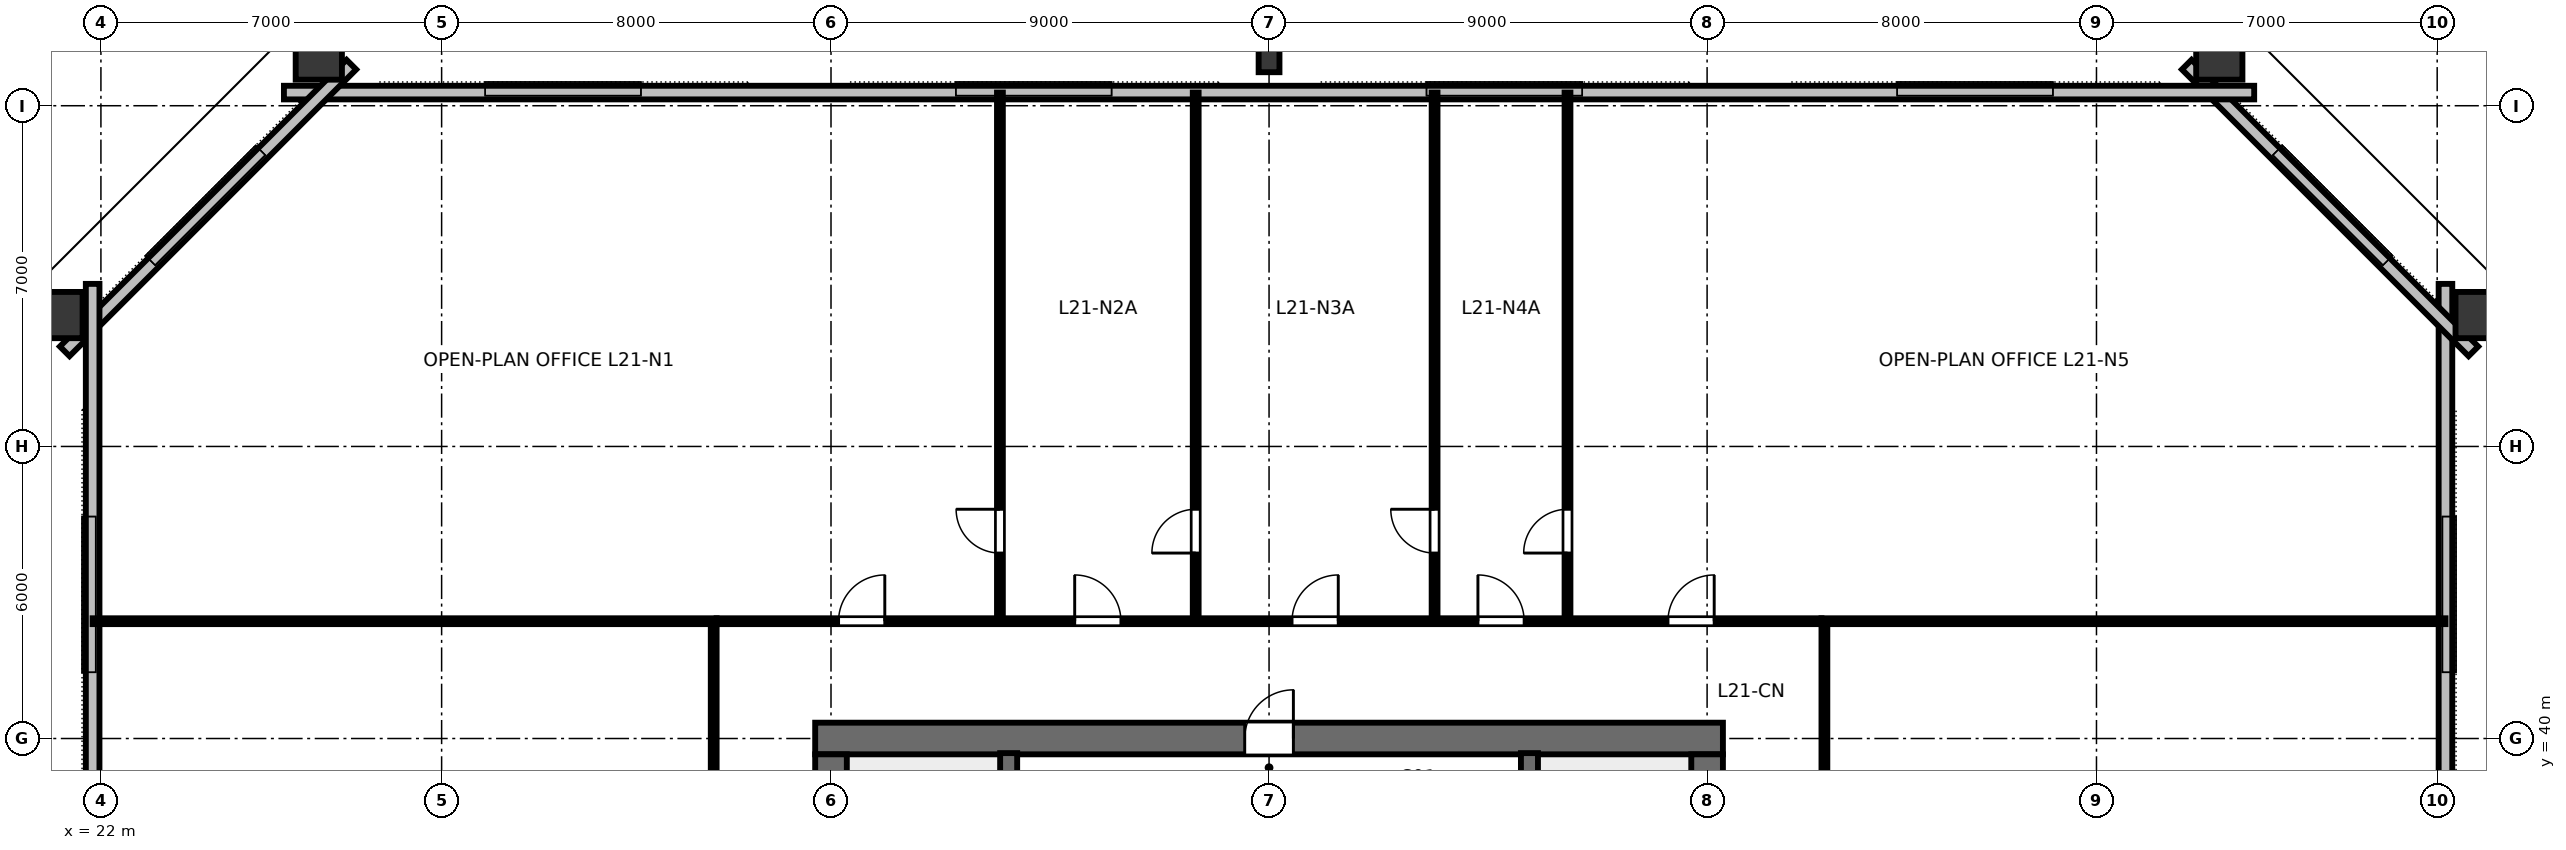
"""IFC4 building model, lengths in metres.
Left out: names, types, materials, properties, quantities, classifications, styles, units other than length and angle.
Written with IfcOpenShell. Run it as: python <this file> out.ifc"""

import sys

from ifc_helpers import new_model, si_unit, direction, frame, frame_2d, origin, origin_2d, place, context, subcontext, project, spatial, rectangle, hollow_rectangle, i_section, extrude, element, fill, save


model = new_model("IFC4")
c1 = context("Model", 3, precision=1e-05, world=origin(), true_north=direction((0.0, 1.0)))
c2 = subcontext(c1, "Body", "Model", "MODEL_VIEW")
j1 = project(units=[si_unit("LENGTHUNIT", "METRE"), si_unit("PLANEANGLEUNIT", "RADIAN")], contexts=[c1])
p1 = place(None, origin())
s1 = spatial("IfcSite", under=j1, at=p1, CompositionType="ELEMENT")
p2 = place(p1, origin())
s2 = spatial("IfcBuilding", under=s1, at=p2, CompositionType="ELEMENT")
p3 = place(p2, frame((0.0, 0.0, 82.0)))
s3 = spatial("IfcBuildingStorey", under=s2, at=p3, CompositionType="ELEMENT", Elevation=82.0)
p4 = place(p3, frame((36.675, 40.0, 0.0), z_axis=(0.0, 0.0, 1.0), x_axis=(1.0, 0.0, 0.0)))
e1 = element("IfcWall", 1, at=p4, inside=s3, PredefinedType="SHEAR", context=c2, shape_type="SweptSolid", body=[
    extrude(rectangle(XDim=18.65, YDim=0.65, at=frame_2d((9.325, 0.0))), origin(), (0.0, 0.0, 1.0), 3.28),
])
p5 = place(p4, frame((8.825, 0.0, 0.0)))
e2 = element("IfcOpeningElement", 2, at=p5, cuts=e1, PredefinedType="OPENING", context=c2, shape_type="SweptSolid", body=[
    extrude(rectangle(XDim=1.0, YDim=2.15, at=frame_2d((0.5, 1.075))), frame((0.0, 0.335, 0.0), z_axis=(0.0, -1.0, 0.0), x_axis=(1.0, 0.0, 0.0)), (0.0, 0.0, 1.0), 0.67),
])
p6 = place(p3, frame((37.0, 24.325, 0.0), z_axis=(0.0, 0.0, 1.0), x_axis=(0.0, 1.0, 0.0)))
e3 = element("IfcWall", 3, at=p6, inside=s3, PredefinedType="SHEAR", context=c2, shape_type="SweptSolid", body=[
    extrude(rectangle(XDim=15.35, YDim=0.65, at=frame_2d((7.675, 0.0))), origin(), (0.0, 0.0, 1.0), 3.28),
])
p7 = place(p6, frame((5.2, 0.0, 0.0)))
e4 = element("IfcOpeningElement", 4, at=p7, cuts=e3, PredefinedType="OPENING", context=c2, shape_type="SweptSolid", body=[
    extrude(rectangle(XDim=1.15, YDim=2.15, at=frame_2d((0.575, 1.075))), frame((0.0, 0.335, 0.0), z_axis=(0.0, -1.0, 0.0), x_axis=(1.0, 0.0, 0.0)), (0.0, 0.0, 1.0), 0.67),
])
p8 = place(p3, frame((55.0, 24.325, 0.0), z_axis=(0.0, 0.0, 1.0), x_axis=(0.0, 1.0, 0.0)))
e5 = element("IfcWall", 5, at=p8, inside=s3, PredefinedType="SHEAR", context=c2, shape_type="SweptSolid", body=[
    extrude(rectangle(XDim=15.35, YDim=0.65, at=frame_2d((7.675, 0.0))), origin(), (0.0, 0.0, 1.0), 3.28),
])
p9 = place(p8, frame((5.2, 0.0, 0.0)))
e6 = element("IfcOpeningElement", 6, at=p9, cuts=e5, PredefinedType="OPENING", context=c2, shape_type="SweptSolid", body=[
    extrude(rectangle(XDim=1.15, YDim=2.15, at=frame_2d((0.575, 1.075))), frame((0.0, 0.335, 0.0), z_axis=(0.0, -1.0, 0.0), x_axis=(1.0, 0.0, 0.0)), (0.0, 0.0, 1.0), 0.67),
])
p10 = place(p3, frame((70.952, 48.699, 0.0), z_axis=(-0.066122964366, -0.070348310744, 0.995328523031), x_axis=(0.6816861236, 0.725246783964, 0.096546005827)))
e7 = element("IfcColumn", 7, at=p10, inside=s3, PredefinedType="COLUMN", context=c2, shape_type="SweptSolid", body=[
    extrude(hollow_rectangle(XDim=0.95, YDim=1.15, WallThickness=0.06, at=origin_2d()), origin(), (0.0, 0.0, 1.0), 3.293),
])
p11 = place(p3, frame((65.523, 54.11, 0.0), z_axis=(-0.080491878848, -0.056033020634, 0.99517905828), x_axis=(0.571330166379, -0.82072031837, 0.0)))
e8 = element("IfcColumn", 8, at=p11, inside=s3, PredefinedType="COLUMN", context=c2, shape_type="SweptSolid", body=[
    extrude(hollow_rectangle(XDim=0.95, YDim=1.15, WallThickness=0.06, at=origin_2d()), origin(), (0.0, 0.0, 1.0), 3.294),
])
p12 = place(p3, frame((46.0, 53.93, 0.0), z_axis=(0.0, -0.055844793021, 0.998439461907), x_axis=(1.0, 0.0, 0.0)))
e9 = element("IfcColumn", 9, at=p12, inside=s3, PredefinedType="COLUMN", context=c2, shape_type="SweptSolid", body=[
    extrude(i_section(OverallWidth=0.428, OverallDepth=0.483, WebThickness=0.051, FlangeThickness=0.082, FilletRadius=0.025, at=origin_2d()), origin(), (0.0, 0.0, 1.0), 3.283),
])
p13 = place(p3, frame((26.477, 54.11, 0.0), z_axis=(0.080491878848, -0.056033020634, 0.99517905828), x_axis=(0.571330166379, 0.82072031837, 0.0)))
e10 = element("IfcColumn", 10, at=p13, inside=s3, PredefinedType="COLUMN", context=c2, shape_type="SweptSolid", body=[
    extrude(hollow_rectangle(XDim=0.95, YDim=1.15, WallThickness=0.06, at=origin_2d()), origin(), (0.0, 0.0, 1.0), 3.294),
])
p14 = place(p3, frame((21.048, 48.699, 0.0), z_axis=(0.066122964366, -0.070348310744, 0.995328523031), x_axis=(-0.6816861236, 0.725246783964, 0.096546005827)))
e11 = element("IfcColumn", 11, at=p14, inside=s3, PredefinedType="COLUMN", context=c2, shape_type="SweptSolid", body=[
    extrude(hollow_rectangle(XDim=0.95, YDim=1.15, WallThickness=0.06, at=origin_2d()), origin(), (0.0, 0.0, 1.0), 3.293),
])
p15 = place(p3, frame((70.17, 14.66, 0.0), z_axis=(0.0, 0.0, 1.0), x_axis=(0.0, 1.0, 0.0)))
e12 = element("IfcWall", 12, at=p15, inside=s3, PredefinedType="STANDARD", context=c2, shape_type="SweptSolid", body=[
    extrude(rectangle(XDim=34.68, YDim=0.28, at=frame_2d((17.34, 0.0))), origin(), (0.0, 0.0, 1.0), 3.28),
])
p16 = place(p3, frame((70.744, 47.955, 0.0), z_axis=(0.0, 0.0, 1.0), x_axis=(-0.707106781187, 0.707106781187, 0.0)))
e13 = element("IfcWall", 13, at=p16, inside=s3, PredefinedType="STANDARD", context=c2, shape_type="SweptSolid", body=[
    extrude(rectangle(XDim=8.329, YDim=0.28, at=frame_2d((4.165, 0.0))), origin(), (0.0, 0.0, 1.0), 2.343),
])
p17 = place(p3, frame((66.24, 53.27, 0.0), z_axis=(0.0, 0.0, 1.0), x_axis=(-1.0, 0.0, 0.0)))
e14 = element("IfcWall", 14, at=p17, inside=s3, PredefinedType="STANDARD", context=c2, shape_type="SweptSolid", body=[
    extrude(rectangle(XDim=40.48, YDim=0.28, at=frame_2d((20.24, 0.0))), origin(), (0.0, 0.0, 1.0), 3.28),
])
p18 = place(p3, frame((27.146, 53.844, 0.0), z_axis=(0.0, 0.0, 1.0), x_axis=(-0.707106781187, -0.707106781187, 0.0)))
e15 = element("IfcWall", 15, at=p18, inside=s3, PredefinedType="STANDARD", context=c2, shape_type="SweptSolid", body=[
    extrude(rectangle(XDim=8.329, YDim=0.28, at=frame_2d((4.165, 0.0))), origin(), (0.0, 0.0, 1.0), 2.343),
])
p19 = place(p3, frame((21.83, 49.34, 0.0), z_axis=(0.0, 0.0, 1.0), x_axis=(0.0, -1.0, 0.0)))
e16 = element("IfcWall", 16, at=p19, inside=s3, PredefinedType="STANDARD", context=c2, shape_type="SweptSolid", body=[
    extrude(rectangle(XDim=34.68, YDim=0.28, at=frame_2d((17.34, 0.0))), origin(), (0.0, 0.0, 1.0), 3.28),
])
for number, where, z_axis, x_axis in (
    (17, (40.65, 32.0, 0.0), (0.0, 0.0, 1.0), (0.0, 1.0, 0.0)),
    (18, (51.35, 32.0, 0.0), (0.0, 0.0, 1.0), (0.0, 1.0, 0.0)),
):
    element("IfcWall", number, at=place(p3, frame(where, z_axis=z_axis, x_axis=x_axis)), inside=s3, PredefinedType="SHEAR", context=c2, shape_type="SweptSolid", body=[
        extrude(rectangle(XDim=7.7, YDim=0.35, at=frame_2d((3.85, 0.0))), origin(), (0.0, 0.0, 1.0), 3.6),
    ])
p20 = place(p3, frame((40.471, 42.41, 0.0), z_axis=(0.0, 0.0, 1.0), x_axis=(0.0, 1.0, 0.0)))
e19 = element("IfcWall", 19, at=p20, inside=s3, PredefinedType="PARTITIONING", context=c2, shape_type="SweptSolid", body=[
    extrude(rectangle(XDim=10.86, YDim=0.12, at=frame_2d((5.43, 0.0))), origin(), (0.0, 0.0, 1.0), 2.56),
])
p21 = place(p20, frame((1.4, 0.0, 0.0)))
e20 = element("IfcOpeningElement", 20, at=p21, cuts=e19, PredefinedType="OPENING", context=c2, shape_type="SweptSolid", body=[
    extrude(rectangle(XDim=0.9, YDim=2.15, at=frame_2d((0.45, 1.075))), frame((0.0, 0.07, 0.0), z_axis=(0.0, -1.0, 0.0), x_axis=(1.0, 0.0, 0.0)), (0.0, 0.0, 1.0), 0.14),
])
p22 = place(p3, frame((44.493, 42.41, 0.0), z_axis=(0.0, 0.0, 1.0), x_axis=(0.0, 1.0, 0.0)))
e21 = element("IfcWall", 21, at=p22, inside=s3, PredefinedType="PARTITIONING", context=c2, shape_type="SweptSolid", body=[
    extrude(rectangle(XDim=10.86, YDim=0.12, at=frame_2d((5.43, 0.0))), origin(), (0.0, 0.0, 1.0), 2.56),
])
p23 = place(p22, frame((1.4, 0.0, 0.0)))
e22 = element("IfcOpeningElement", 22, at=p23, cuts=e21, PredefinedType="OPENING", context=c2, shape_type="SweptSolid", body=[
    extrude(rectangle(XDim=0.9, YDim=2.15, at=frame_2d((0.45, 1.075))), frame((0.0, 0.07, 0.0), z_axis=(0.0, -1.0, 0.0), x_axis=(1.0, 0.0, 0.0)), (0.0, 0.0, 1.0), 0.14),
])
p24 = place(p3, frame((49.401, 42.41, 0.0), z_axis=(0.0, 0.0, 1.0), x_axis=(0.0, 1.0, 0.0)))
e23 = element("IfcWall", 23, at=p24, inside=s3, PredefinedType="PARTITIONING", context=c2, shape_type="SweptSolid", body=[
    extrude(rectangle(XDim=10.86, YDim=0.12, at=frame_2d((5.43, 0.0))), origin(), (0.0, 0.0, 1.0), 2.56),
])
p25 = place(p24, frame((1.4, 0.0, 0.0)))
e24 = element("IfcOpeningElement", 24, at=p25, cuts=e23, PredefinedType="OPENING", context=c2, shape_type="SweptSolid", body=[
    extrude(rectangle(XDim=0.9, YDim=2.15, at=frame_2d((0.45, 1.075))), frame((0.0, 0.07, 0.0), z_axis=(0.0, -1.0, 0.0), x_axis=(1.0, 0.0, 0.0)), (0.0, 0.0, 1.0), 0.14),
])
p26 = place(p3, frame((52.132, 42.41, 0.0), z_axis=(0.0, 0.0, 1.0), x_axis=(0.0, 1.0, 0.0)))
e25 = element("IfcWall", 25, at=p26, inside=s3, PredefinedType="PARTITIONING", context=c2, shape_type="SweptSolid", body=[
    extrude(rectangle(XDim=10.86, YDim=0.12, at=frame_2d((5.43, 0.0))), origin(), (0.0, 0.0, 1.0), 2.56),
])
p27 = place(p26, frame((1.4, 0.0, 0.0)))
e26 = element("IfcOpeningElement", 26, at=p27, cuts=e25, PredefinedType="OPENING", context=c2, shape_type="SweptSolid", body=[
    extrude(rectangle(XDim=0.9, YDim=2.15, at=frame_2d((0.45, 1.075))), frame((0.0, 0.07, 0.0), z_axis=(0.0, -1.0, 0.0), x_axis=(1.0, 0.0, 0.0)), (0.0, 0.0, 1.0), 0.14),
])
p28 = place(p3, frame((34.65, 42.41, 0.0), z_axis=(0.0, 0.0, 1.0), x_axis=(1.0, 0.0, 0.0)))
e27 = element("IfcWall", 27, at=p28, inside=s3, PredefinedType="PARTITIONING", context=c2, shape_type="SweptSolid", body=[
    extrude(rectangle(XDim=22.7, YDim=0.12, at=frame_2d((11.35, 0.0))), origin(), (0.0, 0.0, 1.0), 2.56),
])
p29 = place(p28, frame((2.505, 0.0, 0.0)))
e28 = element("IfcOpeningElement", 28, at=p29, cuts=e27, PredefinedType="OPENING", context=c2, shape_type="SweptSolid", body=[
    extrude(rectangle(XDim=0.95, YDim=2.15, at=frame_2d((0.475, 1.075))), frame((0.0, 0.07, 0.0), z_axis=(0.0, -1.0, 0.0), x_axis=(1.0, 0.0, 0.0)), (0.0, 0.0, 1.0), 0.14),
])
p30 = place(p28, frame((7.357, 0.0, 0.0)))
e29 = element("IfcOpeningElement", 29, at=p30, cuts=e27, PredefinedType="OPENING", context=c2, shape_type="SweptSolid", body=[
    extrude(rectangle(XDim=0.95, YDim=2.15, at=frame_2d((0.475, 1.075))), frame((0.0, 0.07, 0.0), z_axis=(0.0, -1.0, 0.0), x_axis=(1.0, 0.0, 0.0)), (0.0, 0.0, 1.0), 0.14),
])
p31 = place(p28, frame((11.822, 0.0, 0.0)))
e30 = element("IfcOpeningElement", 30, at=p31, cuts=e27, PredefinedType="OPENING", context=c2, shape_type="SweptSolid", body=[
    extrude(rectangle(XDim=0.95, YDim=2.15, at=frame_2d((0.475, 1.075))), frame((0.0, 0.07, 0.0), z_axis=(0.0, -1.0, 0.0), x_axis=(1.0, 0.0, 0.0)), (0.0, 0.0, 1.0), 0.14),
])
p32 = place(p28, frame((15.641, 0.0, 0.0)))
e31 = element("IfcOpeningElement", 31, at=p32, cuts=e27, PredefinedType="OPENING", context=c2, shape_type="SweptSolid", body=[
    extrude(rectangle(XDim=0.95, YDim=2.15, at=frame_2d((0.475, 1.075))), frame((0.0, 0.07, 0.0), z_axis=(0.0, -1.0, 0.0), x_axis=(1.0, 0.0, 0.0)), (0.0, 0.0, 1.0), 0.14),
])
p33 = place(p28, frame((19.546, 0.0, 0.0)))
e32 = element("IfcOpeningElement", 32, at=p33, cuts=e27, PredefinedType="OPENING", context=c2, shape_type="SweptSolid", body=[
    extrude(rectangle(XDim=0.95, YDim=2.15, at=frame_2d((0.475, 1.075))), frame((0.0, 0.07, 0.0), z_axis=(0.0, -1.0, 0.0), x_axis=(1.0, 0.0, 0.0)), (0.0, 0.0, 1.0), 0.14),
])
p34 = place(p3, frame((34.59, 21.65, 0.0), z_axis=(0.0, 0.0, 1.0), x_axis=(0.0, 1.0, 0.0)))
e33 = element("IfcWall", 33, at=p34, inside=s3, PredefinedType="PARTITIONING", context=c2, shape_type="SweptSolid", body=[
    extrude(rectangle(XDim=20.7, YDim=0.12, at=frame_2d((10.35, 0.0))), origin(), (0.0, 0.0, 1.0), 2.56),
])
p35 = place(p34, frame((9.875, 0.0, 0.0)))
e34 = element("IfcOpeningElement", 34, at=p35, cuts=e33, PredefinedType="OPENING", context=c2, shape_type="SweptSolid", body=[
    extrude(rectangle(XDim=0.95, YDim=2.15, at=frame_2d((0.475, 1.075))), frame((0.0, 0.07, 0.0), z_axis=(0.0, -1.0, 0.0), x_axis=(1.0, 0.0, 0.0)), (0.0, 0.0, 1.0), 0.14),
])
p36 = place(p3, frame((57.41, 21.65, 0.0), z_axis=(0.0, 0.0, 1.0), x_axis=(0.0, 1.0, 0.0)))
e35 = element("IfcWall", 35, at=p36, inside=s3, PredefinedType="PARTITIONING", context=c2, shape_type="SweptSolid", body=[
    extrude(rectangle(XDim=20.7, YDim=0.12, at=frame_2d((10.35, 0.0))), origin(), (0.0, 0.0, 1.0), 2.56),
])
p37 = place(p36, frame((6.128, 0.0, 0.0)))
e36 = element("IfcOpeningElement", 36, at=p37, cuts=e35, PredefinedType="OPENING", context=c2, shape_type="SweptSolid", body=[
    extrude(rectangle(XDim=0.95, YDim=2.15, at=frame_2d((0.475, 1.075))), frame((0.0, 0.07, 0.0), z_axis=(0.0, -1.0, 0.0), x_axis=(1.0, 0.0, 0.0)), (0.0, 0.0, 1.0), 0.14),
])
p38 = place(p36, frame((16.278, 0.0, 0.0)))
e37 = element("IfcOpeningElement", 37, at=p38, cuts=e35, PredefinedType="OPENING", context=c2, shape_type="SweptSolid", body=[
    extrude(rectangle(XDim=0.95, YDim=2.15, at=frame_2d((0.475, 1.075))), frame((0.0, 0.07, 0.0), z_axis=(0.0, -1.0, 0.0), x_axis=(1.0, 0.0, 0.0)), (0.0, 0.0, 1.0), 0.14),
])
for number, where, z_axis, x_axis in (
    (38, (34.65, 42.41, 0.0), (0.0, 0.0, 1.0), (-1.0, 0.0, 0.0)),
    (39, (57.35, 42.41, 0.0), (0.0, 0.0, 1.0), (1.0, 0.0, 0.0)),
):
    element("IfcWall", number, at=place(p3, frame(where, z_axis=z_axis, x_axis=x_axis)), inside=s3, PredefinedType="PARTITIONING", context=c2, shape_type="SweptSolid", body=[
        extrude(rectangle(XDim=12.82, YDim=0.12, at=frame_2d((6.41, 0.0))), origin(), (0.0, 0.0, 1.0), 2.56),
    ])
p39 = place(p5, origin())
e40 = element("IfcDoor", 40, at=p39, inside=s3, OperationType="SINGLE_SWING_RIGHT", PredefinedType="DOOR", context=c2, shape_type="SweptSolid", body=[
    extrude(rectangle(XDim=1.0, YDim=2.15, at=frame_2d((0.5, 1.075))), frame((0.0, 0.025, 0.0), z_axis=(0.0, -1.0, 0.0), x_axis=(1.0, 0.0, 0.0)), (0.0, 0.0, 1.0), 0.05),
])
fill(e2, e40)
p40 = place(p21, origin())
e41 = element("IfcDoor", 41, at=p40, inside=s3, OperationType="SINGLE_SWING_RIGHT", PredefinedType="DOOR", context=c2, shape_type="SweptSolid", body=[
    extrude(rectangle(XDim=0.9, YDim=2.15, at=frame_2d((0.45, 1.075))), frame((0.0, 0.025, 0.0), z_axis=(0.0, -1.0, 0.0), x_axis=(1.0, 0.0, 0.0)), (0.0, 0.0, 1.0), 0.05),
])
fill(e20, e41)
p41 = place(p23, origin())
e42 = element("IfcDoor", 42, at=p41, inside=s3, OperationType="SINGLE_SWING_LEFT", PredefinedType="DOOR", context=c2, shape_type="SweptSolid", body=[
    extrude(rectangle(XDim=0.9, YDim=2.15, at=frame_2d((0.45, 1.075))), frame((0.0, 0.025, 0.0), z_axis=(0.0, -1.0, 0.0), x_axis=(1.0, 0.0, 0.0)), (0.0, 0.0, 1.0), 0.05),
])
fill(e22, e42)
p42 = place(p25, origin())
e43 = element("IfcDoor", 43, at=p42, inside=s3, OperationType="SINGLE_SWING_RIGHT", PredefinedType="DOOR", context=c2, shape_type="SweptSolid", body=[
    extrude(rectangle(XDim=0.9, YDim=2.15, at=frame_2d((0.45, 1.075))), frame((0.0, 0.025, 0.0), z_axis=(0.0, -1.0, 0.0), x_axis=(1.0, 0.0, 0.0)), (0.0, 0.0, 1.0), 0.05),
])
fill(e24, e43)
p43 = place(p27, origin())
e44 = element("IfcDoor", 44, at=p43, inside=s3, OperationType="SINGLE_SWING_LEFT", PredefinedType="DOOR", context=c2, shape_type="SweptSolid", body=[
    extrude(rectangle(XDim=0.9, YDim=2.15, at=frame_2d((0.45, 1.075))), frame((0.0, 0.025, 0.0), z_axis=(0.0, -1.0, 0.0), x_axis=(1.0, 0.0, 0.0)), (0.0, 0.0, 1.0), 0.05),
])
fill(e26, e44)
p44 = place(p29, origin())
e45 = element("IfcDoor", 45, at=p44, inside=s3, OperationType="SINGLE_SWING_RIGHT", PredefinedType="DOOR", context=c2, shape_type="SweptSolid", body=[
    extrude(rectangle(XDim=0.95, YDim=2.15, at=frame_2d((0.475, 1.075))), frame((0.0, 0.025, 0.0), z_axis=(0.0, -1.0, 0.0), x_axis=(1.0, 0.0, 0.0)), (0.0, 0.0, 1.0), 0.05),
])
fill(e28, e45)
p45 = place(p30, origin())
e46 = element("IfcDoor", 46, at=p45, inside=s3, OperationType="SINGLE_SWING_LEFT", PredefinedType="DOOR", context=c2, shape_type="SweptSolid", body=[
    extrude(rectangle(XDim=0.95, YDim=2.15, at=frame_2d((0.475, 1.075))), frame((0.0, 0.025, 0.0), z_axis=(0.0, -1.0, 0.0), x_axis=(1.0, 0.0, 0.0)), (0.0, 0.0, 1.0), 0.05),
])
fill(e29, e46)
p46 = place(p31, origin())
e47 = element("IfcDoor", 47, at=p46, inside=s3, OperationType="SINGLE_SWING_RIGHT", PredefinedType="DOOR", context=c2, shape_type="SweptSolid", body=[
    extrude(rectangle(XDim=0.95, YDim=2.15, at=frame_2d((0.475, 1.075))), frame((0.0, 0.025, 0.0), z_axis=(0.0, -1.0, 0.0), x_axis=(1.0, 0.0, 0.0)), (0.0, 0.0, 1.0), 0.05),
])
fill(e30, e47)
p47 = place(p32, origin())
e48 = element("IfcDoor", 48, at=p47, inside=s3, OperationType="SINGLE_SWING_LEFT", PredefinedType="DOOR", context=c2, shape_type="SweptSolid", body=[
    extrude(rectangle(XDim=0.95, YDim=2.15, at=frame_2d((0.475, 1.075))), frame((0.0, 0.025, 0.0), z_axis=(0.0, -1.0, 0.0), x_axis=(1.0, 0.0, 0.0)), (0.0, 0.0, 1.0), 0.05),
])
fill(e31, e48)
p48 = place(p33, origin())
e49 = element("IfcDoor", 49, at=p48, inside=s3, OperationType="SINGLE_SWING_RIGHT", PredefinedType="DOOR", context=c2, shape_type="SweptSolid", body=[
    extrude(rectangle(XDim=0.95, YDim=2.15, at=frame_2d((0.475, 1.075))), frame((0.0, 0.025, 0.0), z_axis=(0.0, -1.0, 0.0), x_axis=(1.0, 0.0, 0.0)), (0.0, 0.0, 1.0), 0.05),
])
fill(e32, e49)
save(model, sys.argv[1])
